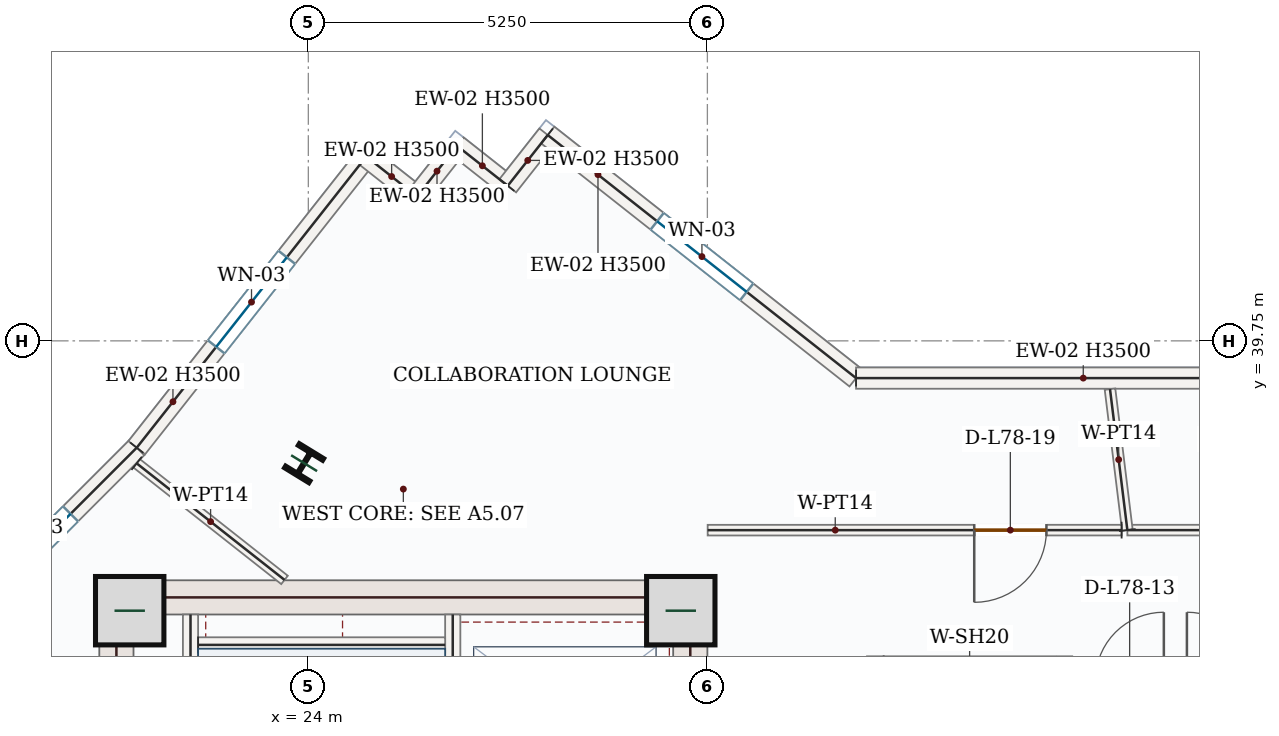
"""IFC4 building model, lengths in metres.
Left out: names, types, materials, properties, quantities, classifications, styles, units other than length and angle.
Written with IfcOpenShell. Run it as: python <this file> out.ifc"""

import sys

from ifc_helpers import new_model, si_unit, direction, frame, frame_2d, origin, origin_2d, place, context, subcontext, project, spatial, rectangle, i_section, extrude, source, transform, mapped, element, fill, save


model = new_model("IFC4")
c1 = context("Model", 3, precision=1e-05, world=origin(), true_north=direction((0.0, 1.0)))
c2 = subcontext(c1, "Body", "Model", "MODEL_VIEW")
j1 = project(units=[si_unit("LENGTHUNIT", "METRE"), si_unit("PLANEANGLEUNIT", "RADIAN")], contexts=[c1])
p1 = place(None, origin())
s1 = spatial("IfcSite", under=j1, at=p1, CompositionType="ELEMENT")
p2 = place(p1, origin())
s2 = spatial("IfcBuilding", under=s1, at=p2, CompositionType="ELEMENT")
p3 = place(p2, frame((0.0, 0.0, 323.55)))
s3 = spatial("IfcBuildingStorey", under=s2, at=p3, CompositionType="ELEMENT", Elevation=323.55)
m1 = source(origin(), c2, "Body", "SweptSolid", [
    extrude(rectangle(XDim=8.55, YDim=0.45, at=frame_2d((4.275, 0.0))), origin(), (0.0, 0.0, 1.0), 3.5),
])
p4 = place(p3, frame((21.475, 28.05, 0.0), z_axis=(0.0, 0.0, 1.0), x_axis=(0.0, 1.0, 0.0)))
e1 = element("IfcWall", 1, at=p4, inside=s3, PredefinedType="SHEAR", context=c2, shape_type="MappedRepresentation", body=[
    mapped(m1, transform((0.0, 0.0, 0.0), x_axis=(1.0, 0.0, 0.0), y_axis=(0.0, 1.0, 0.0), z_axis=(0.0, 0.0, 1.0), scale=1.0)),
])
p5 = place(p3, frame((29.025, 28.05, 0.0), z_axis=(0.0, 0.0, 1.0), x_axis=(0.0, 1.0, 0.0)))
e2 = element("IfcWall", 2, at=p5, inside=s3, PredefinedType="SHEAR", context=c2, shape_type="SweptSolid", body=[
    extrude(rectangle(XDim=8.55, YDim=0.45, at=frame_2d((4.275, 0.0))), origin(), (0.0, 0.0, 1.0), 3.5),
])
p6 = place(p5, frame((1.5, 0.0, 0.0)))
e3 = element("IfcOpeningElement", 3, at=p6, cuts=e2, PredefinedType="OPENING", context=c2, shape_type="SweptSolid", body=[
    extrude(rectangle(XDim=1.1, YDim=2.2, at=frame_2d((0.55, 1.1))), frame((0.0, 0.235, 0.0), z_axis=(0.0, -1.0, 0.0), x_axis=(1.0, 0.0, 0.0)), (0.0, 0.0, 1.0), 0.47),
])
m2 = source(origin(), c2, "Body", "SweptSolid", [
    extrude(rectangle(XDim=7.1, YDim=0.45, at=frame_2d((3.55, 0.0))), origin(), (0.0, 0.0, 1.0), 3.5),
])
p7 = place(p3, frame((21.7, 36.375, 0.0), z_axis=(0.0, 0.0, 1.0), x_axis=(1.0, 0.0, 0.0)))
e4 = element("IfcWall", 4, at=p7, inside=s3, PredefinedType="SHEAR", context=c2, shape_type="MappedRepresentation", body=[
    mapped(m2, transform((0.0, 0.0, 0.0), x_axis=(1.0, 0.0, 0.0), y_axis=(0.0, 1.0, 0.0), z_axis=(0.0, 0.0, 1.0), scale=1.0)),
])
m3 = source(origin(), c2, "Body", "SweptSolid", [
    extrude(rectangle(XDim=0.9, YDim=0.9, at=origin_2d()), origin(), (0.0, 0.0, 1.0), 3.75),
])
for number, where, z_axis, x_axis in (
    (5, (21.65, 36.2, 0.0), (0.0, 0.0, 1.0), (1.0, 0.0, 0.0)),
    (6, (28.9, 36.2, 0.0), (0.0, 0.0, 1.0), (1.0, 0.0, 0.0)),
):
    element("IfcColumn", number, at=place(p3, frame(where, z_axis=z_axis, x_axis=x_axis)), inside=s3, PredefinedType="COLUMN", context=c2, shape_type="MappedRepresentation", body=[
        mapped(m3, transform((0.0, 0.0, 0.0), x_axis=(1.0, 0.0, 0.0), y_axis=(0.0, 1.0, 0.0), z_axis=(0.0, 0.0, 1.0), scale=1.0)),
    ])
m4 = source(origin(), c2, "Body", "SweptSolid", [
    extrude(i_section(OverallWidth=0.374, OverallDepth=0.372, WebThickness=0.016, FlangeThickness=0.026, FilletRadius=0.018, at=origin_2d()), origin(), (0.0, 0.0, 1.0), 3.75),
])
p8 = place(p3, frame((23.945, 38.141, 0.0), z_axis=(0.0, 0.0, 1.0), x_axis=(-0.852640164354, 0.522498564716, 0.0)))
e7 = element("IfcColumn", 7, at=p8, inside=s3, PredefinedType="COLUMN", context=c2, shape_type="MappedRepresentation", body=[
    mapped(m4, transform((0.0, 0.0, 0.0), x_axis=(1.0, 0.0, 0.0), y_axis=(0.0, 1.0, 0.0), z_axis=(0.0, 0.0, 1.0), scale=1.0)),
])
p9 = place(p3, frame((18.94, 35.542, 0.0), z_axis=(0.0, 0.0, 1.0), x_axis=(0.707106781187, 0.707106781187, 0.0)))
e8 = element("IfcWall", 8, at=p9, inside=s3, PredefinedType="SOLIDWALL", context=c2, shape_type="SweptSolid", body=[
    extrude(rectangle(XDim=3.963, YDim=0.28, at=frame_2d((1.982, 0.0))), origin(), (0.0, 0.0, 1.0), 3.5),
])
p10 = place(p9, frame((1.232, 0.0, 0.85)))
e9 = element("IfcOpeningElement", 9, at=p10, cuts=e8, PredefinedType="OPENING", context=c2, shape_type="SweptSolid", body=[
    extrude(rectangle(XDim=1.5, YDim=1.5, at=frame_2d((0.75, 0.75))), frame((0.0, 0.15, 0.0), z_axis=(0.0, -1.0, 0.0), x_axis=(1.0, 0.0, 0.0)), (0.0, 0.0, 1.0), 0.3),
])
p11 = place(p3, frame((21.742, 38.344, 0.0), z_axis=(0.0, 0.0, 1.0), x_axis=(0.619093990715, 0.785316898239, 0.0)))
e10 = element("IfcWall", 10, at=p11, inside=s3, PredefinedType="SOLIDWALL", context=c2, shape_type="SweptSolid", body=[
    extrude(rectangle(XDim=4.878, YDim=0.28, at=frame_2d((2.439, 0.0))), origin(), (0.0, 0.0, 1.0), 3.5),
])
p12 = place(p11, frame((1.689, 0.0, 0.85)))
e11 = element("IfcOpeningElement", 11, at=p12, cuts=e10, PredefinedType="OPENING", context=c2, shape_type="SweptSolid", body=[
    extrude(rectangle(XDim=1.5, YDim=1.5, at=frame_2d((0.75, 0.75))), frame((0.0, 0.15, 0.0), z_axis=(0.0, -1.0, 0.0), x_axis=(1.0, 0.0, 0.0)), (0.0, 0.0, 1.0), 0.3),
])
m5 = source(origin(), c2, "Body", "SweptSolid", [
    extrude(rectangle(XDim=0.85, YDim=0.28, at=frame_2d((0.425, 0.0))), origin(), (0.0, 0.0, 1.0), 3.5),
])
p13 = place(p3, frame((24.762, 42.175, 0.0), z_axis=(0.0, 0.0, 1.0), x_axis=(0.785360476625, -0.619038707801, 0.0)))
e12 = element("IfcWall", 12, at=p13, inside=s3, PredefinedType="SOLIDWALL", context=c2, shape_type="MappedRepresentation", body=[
    mapped(m5, transform((0.0, 0.0, 0.0), x_axis=(1.0, 0.0, 0.0), y_axis=(0.0, 1.0, 0.0), z_axis=(0.0, 0.0, 1.0), scale=1.0)),
])
m6 = source(origin(), c2, "Body", "SweptSolid", [
    extrude(rectangle(XDim=0.85, YDim=0.28, at=frame_2d((0.425, 0.0))), origin(), (0.0, 0.0, 1.0), 3.5),
])
for number, where, z_axis, x_axis in (
    (13, (25.43, 41.649, 0.0), (0.0, 0.0, 1.0), (0.619, 0.785, 0.0)),
    (14, (25.956, 42.316, 0.0), (0.0, 0.0, 1.0), (0.785, -0.619, 0.0)),
):
    element("IfcWall", number, at=place(p3, frame(where, z_axis=z_axis, x_axis=x_axis)), inside=s3, PredefinedType="SOLIDWALL", context=c2, shape_type="MappedRepresentation", body=[
        mapped(m6, transform((0.0, 0.0, 0.0), x_axis=(1.0, 0.0, 0.0), y_axis=(0.0, 1.0, 0.0), z_axis=(0.0, 0.0, 1.0), scale=1.0)),
    ])
m7 = source(origin(), c2, "Body", "SweptSolid", [
    extrude(rectangle(XDim=0.85, YDim=0.28, at=frame_2d((0.425, 0.0))), origin(), (0.0, 0.0, 1.0), 3.5),
])
p14 = place(p3, frame((26.624, 41.79, 0.0), z_axis=(0.0, 0.0, 1.0), x_axis=(0.619076214196, 0.785330911793, 0.0)))
e15 = element("IfcWall", 15, at=p14, inside=s3, PredefinedType="SOLIDWALL", context=c2, shape_type="MappedRepresentation", body=[
    mapped(m7, transform((0.0, 0.0, 0.0), x_axis=(1.0, 0.0, 0.0), y_axis=(0.0, 1.0, 0.0), z_axis=(0.0, 0.0, 1.0), scale=1.0)),
])
p15 = place(p3, frame((27.15, 42.458, 0.0), z_axis=(0.0, 0.0, 1.0), x_axis=(0.78530363687, -0.61911081231, 0.0)))
e16 = element("IfcWall", 16, at=p15, inside=s3, PredefinedType="SOLIDWALL", context=c2, shape_type="SweptSolid", body=[
    extrude(rectangle(XDim=5.165, YDim=0.28, at=frame_2d((2.583, 0.0))), origin(), (0.0, 0.0, 1.0), 3.5),
])
p16 = place(p15, frame((1.833, 0.0, 0.85)))
e17 = element("IfcOpeningElement", 17, at=p16, cuts=e16, PredefinedType="OPENING", context=c2, shape_type="SweptSolid", body=[
    extrude(rectangle(XDim=1.5, YDim=1.5, at=frame_2d((0.75, 0.75))), frame((0.0, 0.15, 0.0), z_axis=(0.0, -1.0, 0.0), x_axis=(1.0, 0.0, 0.0)), (0.0, 0.0, 1.0), 0.3),
])
m8 = source(origin(), c2, "Body", "SweptSolid", [
    extrude(rectangle(XDim=5.978, YDim=0.28, at=frame_2d((2.989, 0.0))), origin(), (0.0, 0.0, 1.0), 3.5),
])
p17 = place(p3, frame((31.206, 39.26, 0.0), z_axis=(0.0, 0.0, 1.0), x_axis=(1.0, 0.0, 0.0)))
e18 = element("IfcWall", 18, at=p17, inside=s3, PredefinedType="SOLIDWALL", context=c2, shape_type="MappedRepresentation", body=[
    mapped(m8, transform((0.0, 0.0, 0.0), x_axis=(1.0, 0.0, 0.0), y_axis=(0.0, 1.0, 0.0), z_axis=(0.0, 0.0, 1.0), scale=1.0)),
])
m9 = source(origin(), c2, "Body", "SweptSolid", [
    extrude(rectangle(XDim=7.87, YDim=0.2, at=frame_2d((3.935, 0.0))), origin(), (0.0, 0.0, 1.0), 3.5),
])
p18 = place(p3, frame((22.45, 28.28, 0.0), z_axis=(0.0, 0.0, 1.0), x_axis=(0.0, 1.0, 0.0)))
e19 = element("IfcWall", 19, at=p18, inside=s3, PredefinedType="SOLIDWALL", context=c2, shape_type="MappedRepresentation", body=[
    mapped(m9, transform((0.0, 0.0, 0.0), x_axis=(1.0, 0.0, 0.0), y_axis=(0.0, 1.0, 0.0), z_axis=(0.0, 0.0, 1.0), scale=1.0)),
])
p19 = place(p3, frame((25.9, 28.15, 0.0), z_axis=(0.0, 0.0, 1.0), x_axis=(0.0, 1.0, 0.0)))
e20 = element("IfcWall", 20, at=p19, inside=s3, PredefinedType="SOLIDWALL", context=c2, shape_type="SweptSolid", body=[
    extrude(rectangle(XDim=8.0, YDim=0.2, at=frame_2d((4.0, 0.0))), origin(), (0.0, 0.0, 1.0), 3.5),
])
p20 = place(p19, frame((0.4, 0.0, 0.0)))
e21 = element("IfcOpeningElement", 21, at=p20, cuts=e20, PredefinedType="OPENING", context=c2, shape_type="SweptSolid", body=[
    extrude(rectangle(XDim=1.05, YDim=2.15, at=frame_2d((0.525, 1.075))), frame((0.0, 0.11, 0.0), z_axis=(0.0, -1.0, 0.0), x_axis=(1.0, 0.0, 0.0)), (0.0, 0.0, 1.0), 0.22),
])
m10 = source(origin(), c2, "Body", "SweptSolid", [
    extrude(rectangle(XDim=3.25, YDim=0.2, at=frame_2d((1.625, 0.0))), origin(), (0.0, 0.0, 1.0), 3.5),
])
p21 = place(p3, frame((22.55, 35.75, 0.0), z_axis=(0.0, 0.0, 1.0), x_axis=(1.0, 0.0, 0.0)))
e22 = element("IfcWall", 22, at=p21, inside=s3, PredefinedType="SOLIDWALL", context=c2, shape_type="MappedRepresentation", body=[
    mapped(m10, transform((0.0, 0.0, 0.0), x_axis=(1.0, 0.0, 0.0), y_axis=(0.0, 1.0, 0.0), z_axis=(0.0, 0.0, 1.0), scale=1.0)),
])
p22 = place(p3, frame((31.45, 33.2, 0.0), z_axis=(0.0, 0.0, 1.0), x_axis=(0.0, 1.0, 0.0)))
e23 = element("IfcWall", 23, at=p22, inside=s3, PredefinedType="SOLIDWALL", context=c2, shape_type="SweptSolid", body=[
    extrude(rectangle(XDim=2.4, YDim=0.2, at=frame_2d((1.2, 0.0))), origin(), (0.0, 0.0, 1.0), 3.5),
])
p23 = place(p22, frame((0.65, 0.0, 0.0)))
e24 = element("IfcOpeningElement", 24, at=p23, cuts=e23, PredefinedType="OPENING", context=c2, shape_type="SweptSolid", body=[
    extrude(rectangle(XDim=1.1, YDim=2.15, at=frame_2d((0.55, 1.075))), frame((0.0, 0.11, 0.0), z_axis=(0.0, -1.0, 0.0), x_axis=(1.0, 0.0, 0.0)), (0.0, 0.0, 1.0), 0.22),
])
m11 = source(origin(), c2, "Body", "SweptSolid", [
    extrude(rectangle(XDim=2.4, YDim=0.2, at=frame_2d((1.2, 0.0))), origin(), (0.0, 0.0, 1.0), 3.5),
])
p24 = place(p3, frame((33.95, 33.2, 0.0), z_axis=(0.0, 0.0, 1.0), x_axis=(0.0, 1.0, 0.0)))
e25 = element("IfcWall", 25, at=p24, inside=s3, PredefinedType="SOLIDWALL", context=c2, shape_type="MappedRepresentation", body=[
    mapped(m11, transform((0.0, 0.0, 0.0), x_axis=(1.0, 0.0, 0.0), y_axis=(0.0, 1.0, 0.0), z_axis=(0.0, 0.0, 1.0), scale=1.0)),
])
m12 = source(origin(), c2, "Body", "SweptSolid", [
    extrude(rectangle(XDim=2.477, YDim=0.14, at=frame_2d((1.239, 0.0))), origin(), (0.0, 0.0, 1.0), 3.5),
])
p25 = place(p3, frame((21.742, 38.138, 0.0), z_axis=(0.0, 0.0, 1.0), x_axis=(0.785339198937, -0.619065701371, 0.0)))
e26 = element("IfcWall", 26, at=p25, inside=s3, PredefinedType="PARTITIONING", context=c2, shape_type="MappedRepresentation", body=[
    mapped(m12, transform((0.0, 0.0, 0.0), x_axis=(1.0, 0.0, 0.0), y_axis=(0.0, 1.0, 0.0), z_axis=(0.0, 0.0, 1.0), scale=1.0)),
])
p26 = place(p3, frame((40.612, 37.26, 0.0), z_axis=(0.0, 0.0, 1.0), x_axis=(-1.0, 0.0, 0.0)))
e27 = element("IfcWall", 27, at=p26, inside=s3, PredefinedType="PARTITIONING", context=c2, shape_type="SweptSolid", body=[
    extrude(rectangle(XDim=5.837, YDim=0.14, at=frame_2d((2.918, 0.0))), origin(), (0.0, 0.0, 1.0), 3.5),
])
p27 = place(p26, frame((3.812, 0.0, 0.0)))
e28 = element("IfcOpeningElement", 28, at=p27, cuts=e27, PredefinedType="OPENING", context=c2, shape_type="SweptSolid", body=[
    extrude(rectangle(XDim=0.95, YDim=2.15, at=frame_2d((0.475, 1.075))), frame((0.0, 0.08, 0.0), z_axis=(0.0, -1.0, 0.0), x_axis=(1.0, 0.0, 0.0)), (0.0, 0.0, 1.0), 0.16),
])
m13 = source(origin(), c2, "Body", "SweptSolid", [
    extrude(rectangle(XDim=1.869, YDim=0.14, at=frame_2d((0.934, 0.0))), origin(), (0.0, 0.0, 1.0), 3.5),
])
p28 = place(p3, frame((34.775, 37.26, 0.0), z_axis=(0.0, 0.0, 1.0), x_axis=(-0.122153221409, 0.992511254596, 0.0)))
e29 = element("IfcWall", 29, at=p28, inside=s3, PredefinedType="PARTITIONING", context=c2, shape_type="MappedRepresentation", body=[
    mapped(m13, transform((0.0, 0.0, 0.0), x_axis=(1.0, 0.0, 0.0), y_axis=(0.0, 1.0, 0.0), z_axis=(0.0, 0.0, 1.0), scale=1.0)),
])
p29 = place(p3, frame((34.7, 37.26, 0.0), z_axis=(0.0, 0.0, 1.0), x_axis=(-0.999999995981, -8.9657955e-05, 0.0)))
e30 = element("IfcWall", 30, at=p29, inside=s3, PredefinedType="PARTITIONING", context=c2, shape_type="SweptSolid", body=[
    extrude(rectangle(XDim=5.446, YDim=0.14, at=frame_2d((2.723, 0.0))), origin(), (0.0, 0.0, 1.0), 3.5),
])
p30 = place(p29, frame((0.989, 0.0, 0.0)))
e31 = element("IfcOpeningElement", 31, at=p30, cuts=e30, PredefinedType="OPENING", context=c2, shape_type="SweptSolid", body=[
    extrude(rectangle(XDim=0.95, YDim=2.15, at=frame_2d((0.475, 1.075))), frame((0.0, 0.08, 0.0), z_axis=(0.0, -1.0, 0.0), x_axis=(1.0, 0.0, 0.0)), (0.0, 0.0, 1.0), 0.16),
])
m14 = source(origin(), c2, "Body", "SweptSolid", [
    extrude(rectangle(XDim=1.5, YDim=1.5, at=frame_2d((0.75, 0.75))), frame((0.0, 0.03, 0.0), z_axis=(0.0, -1.0, 0.0), x_axis=(1.0, 0.0, 0.0)), (0.0, 0.0, 1.0), 0.06),
])
p31 = place(p10, origin())
e32 = element("IfcWindow", 32, at=p31, inside=s3, PartitioningType="SINGLE_PANEL", PredefinedType="WINDOW", context=c2, shape_type="MappedRepresentation", body=[
    mapped(m14, transform((0.0, 0.0, 0.0), x_axis=(1.0, 0.0, 0.0), y_axis=(0.0, 1.0, 0.0), z_axis=(0.0, 0.0, 1.0), scale=1.0)),
])
fill(e9, e32)
p32 = place(p12, origin())
e33 = element("IfcWindow", 33, at=p32, inside=s3, PartitioningType="SINGLE_PANEL", PredefinedType="WINDOW", context=c2, shape_type="MappedRepresentation", body=[
    mapped(m14, transform((0.0, 0.0, 0.0), x_axis=(1.0, 0.0, 0.0), y_axis=(0.0, 1.0, 0.0), z_axis=(0.0, 0.0, 1.0), scale=1.0)),
])
fill(e11, e33)
p33 = place(p16, origin())
e34 = element("IfcWindow", 34, at=p33, inside=s3, PartitioningType="SINGLE_PANEL", PredefinedType="WINDOW", context=c2, shape_type="MappedRepresentation", body=[
    mapped(m14, transform((0.0, 0.0, 0.0), x_axis=(1.0, 0.0, 0.0), y_axis=(0.0, 1.0, 0.0), z_axis=(0.0, 0.0, 1.0), scale=1.0)),
])
fill(e17, e34)
m15 = source(origin(), c2, "Body", "SweptSolid", [
    extrude(rectangle(XDim=0.95, YDim=2.15, at=frame_2d((0.475, 1.075))), frame((0.0, 0.025, 0.0), z_axis=(0.0, -1.0, 0.0), x_axis=(1.0, 0.0, 0.0)), (0.0, 0.0, 1.0), 0.05),
])
p34 = place(p30, origin())
e35 = element("IfcDoor", 35, at=p34, inside=s3, OperationType="SINGLE_SWING_RIGHT", PredefinedType="DOOR", context=c2, shape_type="MappedRepresentation", body=[
    mapped(m15, transform((0.0, 0.0, 0.0), x_axis=(1.0, 0.0, 0.0), y_axis=(0.0, 1.0, 0.0), z_axis=(0.0, 0.0, 1.0), scale=1.0)),
])
fill(e31, e35)
save(model, sys.argv[1])
